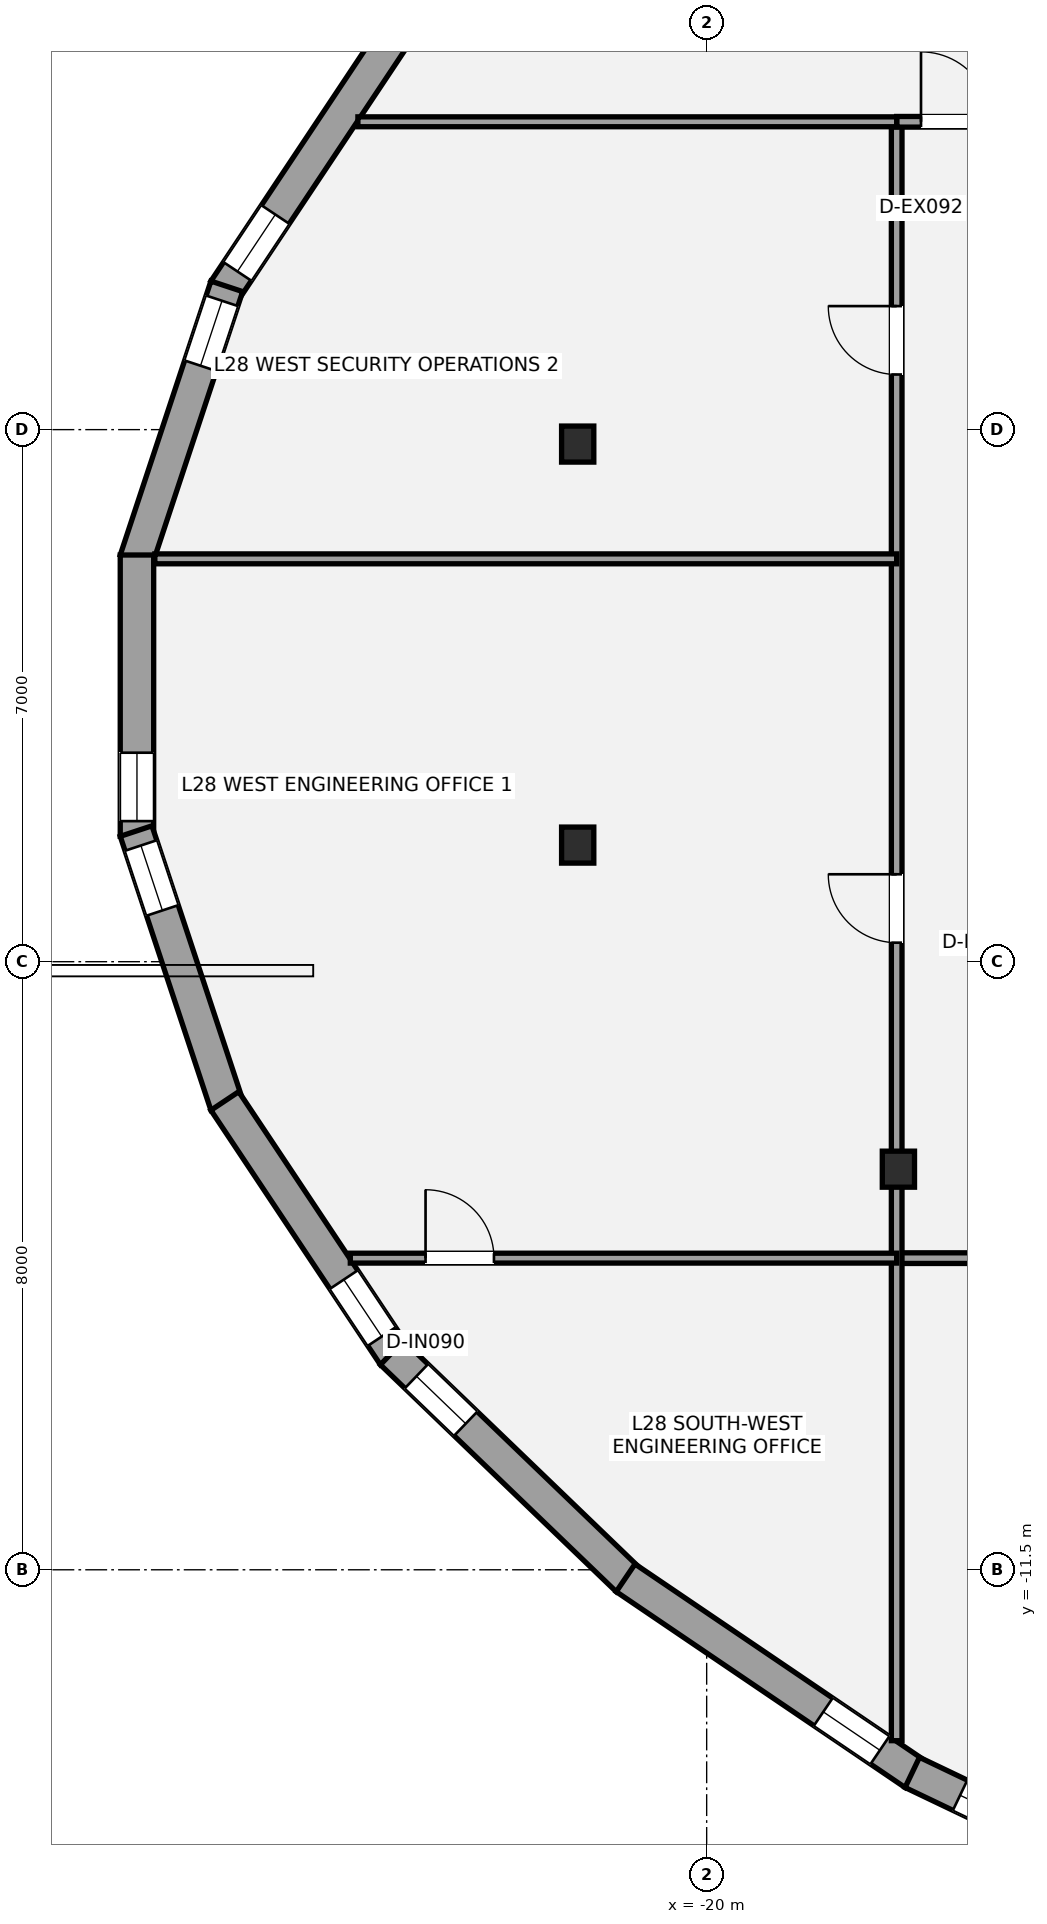
"""IFC4 building model, lengths in metres.
Left out: names, types, materials, properties, quantities, classifications, styles, units other than length and angle.
Written with IfcOpenShell. Run it as: python <this file> out.ifc"""

import sys

from ifc_helpers import new_model, si_unit, direction, frame, frame_2d, origin, origin_2d, place, context, subcontext, project, spatial, rectangle, i_section, extrude, element, fill, save


model = new_model("IFC4")
c1 = context("Model", 3, precision=1e-05, world=origin(), true_north=direction((0.0, 1.0)))
c2 = subcontext(c1, "Body", "Model", "MODEL_VIEW")
j1 = project(units=[si_unit("LENGTHUNIT", "METRE"), si_unit("PLANEANGLEUNIT", "RADIAN")], contexts=[c1])
p1 = place(None, origin())
s1 = spatial("IfcSite", under=j1, at=p1, CompositionType="ELEMENT")
p2 = place(p1, origin())
s2 = spatial("IfcBuilding", under=s1, at=p2, CompositionType="ELEMENT")
p3 = place(p2, frame((0.0, 0.0, 107.1)))
s3 = spatial("IfcBuildingStorey", under=s2, at=p3, CompositionType="ELEMENT", Elevation=107.1)
for number, where, z_axis, x_axis in (
    (1, (-21.697, 3.31, 0.0), (0.0, 0.0, 1.0), (1.0, 0.0, 0.0)),
    (2, (-21.697, -1.966, 0.0), (0.0, 0.0, 1.0), (1.0, 0.0, 0.0)),
    (3, (-17.477, -6.229, 0.0), (0.0, 0.0, 1.0), (1.0, 0.0, 0.0)),
):
    element("IfcColumn", number, at=place(p3, frame(where, z_axis=z_axis, x_axis=x_axis)), inside=s3, PredefinedType="COLUMN", context=c2, shape_type="SweptSolid", body=[
        extrude(i_section(OverallWidth=0.424, OverallDepth=0.474, WebThickness=0.048, FlangeThickness=0.077, at=origin_2d()), origin(), (0.0, 0.0, 1.0), 3.5),
    ])
p4 = place(p3, frame((-26.34, 5.332, 0.0), z_axis=(0.0, 0.0, 1.0), x_axis=(0.554293965046, 0.83232097193, 0.0)))
e4 = element("IfcWall", 4, at=p4, inside=s3, PredefinedType="STANDARD", context=c2, shape_type="SweptSolid", body=[
    extrude(rectangle(XDim=4.023, YDim=0.44, at=frame_2d((2.011, 0.0))), origin(), (0.0, 0.0, 1.0), 2.528),
])
p5 = place(p4, frame((0.299, 0.0, 0.58)))
e5 = element("IfcOpeningElement", 5, at=p5, cuts=e4, PredefinedType="OPENING", context=c2, shape_type="SweptSolid", body=[
    extrude(rectangle(XDim=0.9, YDim=1.35, at=frame_2d((0.45, 0.675))), frame((0.0, 0.23, 0.0), z_axis=(0.0, -1.0, 0.0), x_axis=(1.0, 0.0, 0.0)), (0.0, 0.0, 1.0), 0.46),
])
p6 = place(p3, frame((-27.507, 1.781, 0.0), z_axis=(0.0, 0.0, 1.0), x_axis=(0.314316911692, 0.94931811266, 0.0)))
e6 = element("IfcWall", 6, at=p6, inside=s3, PredefinedType="STANDARD", context=c2, shape_type="SweptSolid", body=[
    extrude(rectangle(XDim=3.796, YDim=0.44, at=frame_2d((1.898, 0.0))), origin(), (0.0, 0.0, 1.0), 2.528),
])
p7 = place(p6, frame((2.696, 0.0, 0.58)))
e7 = element("IfcOpeningElement", 7, at=p7, cuts=e6, PredefinedType="OPENING", context=c2, shape_type="SweptSolid", body=[
    extrude(rectangle(XDim=0.9, YDim=1.35, at=frame_2d((0.45, 0.675))), frame((0.0, 0.23, 0.0), z_axis=(0.0, -1.0, 0.0), x_axis=(1.0, 0.0, 0.0)), (0.0, 0.0, 1.0), 0.46),
])
p8 = place(p3, frame((-27.496, -1.851, 0.0), z_axis=(0.0, 0.0, 1.0), x_axis=(0.0, 1.0, 0.0)))
e8 = element("IfcWall", 8, at=p8, inside=s3, PredefinedType="STANDARD", context=c2, shape_type="SweptSolid", body=[
    extrude(rectangle(XDim=3.701, YDim=0.44, at=frame_2d((1.851, 0.0))), origin(), (0.0, 0.0, 1.0), 2.528),
])
p9 = place(p8, frame((0.2, 0.0, 0.42)))
e9 = element("IfcOpeningElement", 9, at=p9, cuts=e8, PredefinedType="OPENING", context=c2, shape_type="SweptSolid", body=[
    extrude(rectangle(XDim=0.9, YDim=1.35, at=frame_2d((0.45, 0.675))), frame((0.0, 0.23, 0.0), z_axis=(0.0, -1.0, 0.0), x_axis=(1.0, 0.0, 0.0)), (0.0, 0.0, 1.0), 0.46),
])
p10 = place(p3, frame((-26.314, -5.385, 0.0), z_axis=(0.0, 0.0, 1.0), x_axis=(-0.314316911692, 0.94931811266, 0.0)))
e10 = element("IfcWall", 10, at=p10, inside=s3, PredefinedType="STANDARD", context=c2, shape_type="SweptSolid", body=[
    extrude(rectangle(XDim=3.796, YDim=0.44, at=frame_2d((1.898, 0.0))), origin(), (0.0, 0.0, 1.0), 2.528),
])
p11 = place(p10, frame((2.696, 0.0, 0.58)))
e11 = element("IfcOpeningElement", 11, at=p11, cuts=e10, PredefinedType="OPENING", context=c2, shape_type="SweptSolid", body=[
    extrude(rectangle(XDim=0.9, YDim=1.35, at=frame_2d((0.45, 0.675))), frame((0.0, 0.23, 0.0), z_axis=(0.0, -1.0, 0.0), x_axis=(1.0, 0.0, 0.0)), (0.0, 0.0, 1.0), 0.46),
])
p12 = place(p3, frame((-24.11, -8.68, 0.0), z_axis=(0.0, 0.0, 1.0), x_axis=(-0.554293965046, 0.83232097193, 0.0)))
e12 = element("IfcWall", 12, at=p12, inside=s3, PredefinedType="STANDARD", context=c2, shape_type="SweptSolid", body=[
    extrude(rectangle(XDim=4.023, YDim=0.44, at=frame_2d((2.011, 0.0))), origin(), (0.0, 0.0, 1.0), 2.528),
])
p13 = place(p12, frame((0.299, 0.0, 0.58)))
e13 = element("IfcOpeningElement", 13, at=p13, cuts=e12, PredefinedType="OPENING", context=c2, shape_type="SweptSolid", body=[
    extrude(rectangle(XDim=0.9, YDim=1.35, at=frame_2d((0.45, 0.675))), frame((0.0, 0.23, 0.0), z_axis=(0.0, -1.0, 0.0), x_axis=(1.0, 0.0, 0.0)), (0.0, 0.0, 1.0), 0.46),
])
p14 = place(p3, frame((-21.037, -11.63, 0.0), z_axis=(0.0, 0.0, 1.0), x_axis=(-0.720581378362, 0.693370375166, 0.0)))
e14 = element("IfcWall", 14, at=p14, inside=s3, PredefinedType="STANDARD", context=c2, shape_type="SweptSolid", body=[
    extrude(rectangle(XDim=4.307, YDim=0.44, at=frame_2d((2.153, 0.0))), origin(), (0.0, 0.0, 1.0), 2.528),
])
p15 = place(p14, frame((2.96, 0.0, 0.58)))
e15 = element("IfcOpeningElement", 15, at=p15, cuts=e14, PredefinedType="OPENING", context=c2, shape_type="SweptSolid", body=[
    extrude(rectangle(XDim=0.9, YDim=1.35, at=frame_2d((0.45, 0.675))), frame((0.0, 0.23, 0.0), z_axis=(0.0, -1.0, 0.0), x_axis=(1.0, 0.0, 0.0)), (0.0, 0.0, 1.0), 0.46),
])
p16 = place(p3, frame((-17.266, -14.182, 0.0), z_axis=(0.0, 0.0, 1.0), x_axis=(-0.827754551165, 0.56109036975, 0.0)))
e16 = element("IfcWall", 16, at=p16, inside=s3, PredefinedType="STANDARD", context=c2, shape_type="SweptSolid", body=[
    extrude(rectangle(XDim=4.591, YDim=0.44, at=frame_2d((2.295, 0.0))), origin(), (0.0, 0.0, 1.0), 2.528),
])
p17 = place(p16, frame((0.549, 0.0, 0.58)))
e17 = element("IfcOpeningElement", 17, at=p17, cuts=e16, PredefinedType="OPENING", context=c2, shape_type="SweptSolid", body=[
    extrude(rectangle(XDim=0.9, YDim=1.35, at=frame_2d((0.45, 0.675))), frame((0.0, 0.23, 0.0), z_axis=(0.0, -1.0, 0.0), x_axis=(1.0, 0.0, 0.0)), (0.0, 0.0, 1.0), 0.46),
])
p18 = place(p3, frame((-12.89, -16.27, 0.0), z_axis=(0.0, 0.0, 1.0), x_axis=(-0.902372757907, 0.430956385018, 0.0)))
e18 = element("IfcWall", 18, at=p18, inside=s3, PredefinedType="STANDARD", context=c2, shape_type="SweptSolid", body=[
    extrude(rectangle(XDim=4.882, YDim=0.44, at=frame_2d((2.441, 0.0))), origin(), (0.0, 0.0, 1.0), 2.528),
])
p19 = place(p18, frame((3.284, 0.0, 0.58)))
e19 = element("IfcOpeningElement", 19, at=p19, cuts=e18, PredefinedType="OPENING", context=c2, shape_type="SweptSolid", body=[
    extrude(rectangle(XDim=0.9, YDim=1.35, at=frame_2d((0.45, 0.675))), frame((0.0, 0.23, 0.0), z_axis=(0.0, -1.0, 0.0), x_axis=(1.0, 0.0, 0.0)), (0.0, 0.0, 1.0), 0.46),
])
p20 = place(p3, frame((-17.5, -7.4, 0.0), z_axis=(0.0, 0.0, 1.0), x_axis=(1.0, 0.0, 0.0)))
e20 = element("IfcWall", 20, at=p20, inside=s3, PredefinedType="PARTITIONING", context=c2, shape_type="SweptSolid", body=[
    extrude(rectangle(XDim=33.2, YDim=0.14, at=frame_2d((16.6, 0.0))), origin(), (0.0, 0.0, 1.0), 2.688),
])
p21 = place(p20, frame((6.3, 0.0, 0.0)))
e21 = element("IfcOpeningElement", 21, at=p21, cuts=e20, PredefinedType="OPENING", context=c2, shape_type="SweptSolid", body=[
    extrude(rectangle(XDim=0.9, YDim=2.1, at=frame_2d((0.45, 1.05))), frame((0.0, 0.08, 0.0), z_axis=(0.0, -1.0, 0.0), x_axis=(1.0, 0.0, 0.0)), (0.0, 0.0, 1.0), 0.16),
])
p22 = place(p20, frame((18.05, 0.0, 0.0)))
e22 = element("IfcOpeningElement", 22, at=p22, cuts=e20, PredefinedType="OPENING", context=c2, shape_type="SweptSolid", body=[
    extrude(rectangle(XDim=0.9, YDim=2.1, at=frame_2d((0.45, 1.05))), frame((0.0, 0.08, 0.0), z_axis=(0.0, -1.0, 0.0), x_axis=(1.0, 0.0, 0.0)), (0.0, 0.0, 1.0), 0.16),
])
p23 = place(p20, frame((27.9, 0.0, 0.0)))
e23 = element("IfcOpeningElement", 23, at=p23, cuts=e20, PredefinedType="OPENING", context=c2, shape_type="SweptSolid", body=[
    extrude(rectangle(XDim=0.9, YDim=2.1, at=frame_2d((0.45, 1.05))), frame((0.0, 0.08, 0.0), z_axis=(0.0, -1.0, 0.0), x_axis=(1.0, 0.0, 0.0)), (0.0, 0.0, 1.0), 0.16),
])
p24 = place(p3, frame((-17.5, -13.748, 0.0), z_axis=(0.0, 0.0, 1.0), x_axis=(0.0, 1.0, 0.0)))
e24 = element("IfcWall", 24, at=p24, inside=s3, PredefinedType="PARTITIONING", context=c2, shape_type="SweptSolid", body=[
    extrude(rectangle(XDim=21.298, YDim=0.14, at=frame_2d((10.649, 0.0))), origin(), (0.0, 0.0, 1.0), 2.688),
])
p25 = place(p24, frame((10.499, 0.0, 0.0)))
e25 = element("IfcOpeningElement", 25, at=p25, cuts=e24, PredefinedType="OPENING", context=c2, shape_type="SweptSolid", body=[
    extrude(rectangle(XDim=0.9, YDim=2.1, at=frame_2d((0.45, 1.05))), frame((0.0, 0.08, 0.0), z_axis=(0.0, -1.0, 0.0), x_axis=(1.0, 0.0, 0.0)), (0.0, 0.0, 1.0), 0.16),
])
p26 = place(p24, frame((17.974, 0.0, 0.0)))
e26 = element("IfcOpeningElement", 26, at=p26, cuts=e24, PredefinedType="OPENING", context=c2, shape_type="SweptSolid", body=[
    extrude(rectangle(XDim=0.9, YDim=2.1, at=frame_2d((0.45, 1.05))), frame((0.0, 0.08, 0.0), z_axis=(0.0, -1.0, 0.0), x_axis=(1.0, 0.0, 0.0)), (0.0, 0.0, 1.0), 0.16),
])
p27 = place(p3, frame((-17.5, 7.55, 0.0), z_axis=(0.0, 0.0, 1.0), x_axis=(1.0, 0.0, 0.0)))
e27 = element("IfcWall", 27, at=p27, inside=s3, PredefinedType="PARTITIONING", context=c2, shape_type="SweptSolid", body=[
    extrude(rectangle(XDim=3.6, YDim=0.14, at=frame_2d((1.8, 0.0))), origin(), (0.0, 0.0, 1.0), 3.31),
])
p28 = place(p27, frame((0.32, 0.0, 0.0)))
e28 = element("IfcOpeningElement", 28, at=p28, cuts=e27, PredefinedType="OPENING", context=c2, shape_type="SweptSolid", body=[
    extrude(rectangle(XDim=0.92, YDim=2.15, at=frame_2d((0.46, 1.075))), frame((0.0, 0.08, 0.0), z_axis=(0.0, -1.0, 0.0), x_axis=(1.0, 0.0, 0.0)), (0.0, 0.0, 1.0), 0.16),
])
p29 = place(p3, frame((-24.589, 7.55, 0.0), z_axis=(0.0, 0.0, 1.0), x_axis=(1.0, 0.0, 0.0)))
e29 = element("IfcWall", 29, at=p29, inside=s3, PredefinedType="PARTITIONING", context=c2, shape_type="SweptSolid", body=[
    extrude(rectangle(XDim=7.089, YDim=0.13, at=frame_2d((3.544, 0.0))), origin(), (0.0, 0.0, 1.0), 2.763),
])
p30 = place(p3, frame((-24.689, -7.4, 0.0), z_axis=(0.0, 0.0, 1.0), x_axis=(1.0, 0.0, 0.0)))
e30 = element("IfcWall", 30, at=p30, inside=s3, PredefinedType="PARTITIONING", context=c2, shape_type="SweptSolid", body=[
    extrude(rectangle(XDim=7.189, YDim=0.13, at=frame_2d((3.594, 0.0))), origin(), (0.0, 0.0, 1.0), 2.763),
])
p31 = place(p30, frame((0.99, 0.0, 0.0)))
e31 = element("IfcOpeningElement", 31, at=p31, cuts=e30, PredefinedType="OPENING", context=c2, shape_type="SweptSolid", body=[
    extrude(rectangle(XDim=0.9, YDim=2.1, at=frame_2d((0.45, 1.05))), frame((0.0, 0.075, 0.0), z_axis=(0.0, -1.0, 0.0), x_axis=(1.0, 0.0, 0.0)), (0.0, 0.0, 1.0), 0.15),
])
p32 = place(p3, frame((-27.26, 1.8, 0.0), z_axis=(0.0, 0.0, 1.0), x_axis=(1.0, 0.0, 0.0)))
e32 = element("IfcWall", 32, at=p32, inside=s3, PredefinedType="PARTITIONING", context=c2, shape_type="SweptSolid", body=[
    extrude(rectangle(XDim=9.76, YDim=0.13, at=frame_2d((4.88, 0.0))), origin(), (0.0, 0.0, 1.0), 2.763),
])
p33 = place(p5, origin())
e33 = element("IfcWindow", 33, at=p33, inside=s3, PartitioningType="SINGLE_PANEL", PredefinedType="WINDOW", context=c2, shape_type="SweptSolid", body=[
    extrude(rectangle(XDim=0.9, YDim=1.35, at=frame_2d((0.45, 0.675))), frame((0.0, -0.01, 0.0), z_axis=(0.0, -1.0, 0.0), x_axis=(1.0, 0.0, 0.0)), (0.0, 0.0, 1.0), 0.06),
])
fill(e5, e33)
p34 = place(p7, origin())
e34 = element("IfcWindow", 34, at=p34, inside=s3, PartitioningType="SINGLE_PANEL", PredefinedType="WINDOW", context=c2, shape_type="SweptSolid", body=[
    extrude(rectangle(XDim=0.9, YDim=1.35, at=frame_2d((0.45, 0.675))), frame((0.0, -0.01, 0.0), z_axis=(0.0, -1.0, 0.0), x_axis=(1.0, 0.0, 0.0)), (0.0, 0.0, 1.0), 0.06),
])
fill(e7, e34)
p35 = place(p9, origin())
e35 = element("IfcWindow", 35, at=p35, inside=s3, PartitioningType="SINGLE_PANEL", PredefinedType="WINDOW", context=c2, shape_type="SweptSolid", body=[
    extrude(rectangle(XDim=0.9, YDim=1.35, at=frame_2d((0.45, 0.675))), frame((0.0, -0.01, 0.0), z_axis=(0.0, -1.0, 0.0), x_axis=(1.0, 0.0, 0.0)), (0.0, 0.0, 1.0), 0.06),
])
fill(e9, e35)
p36 = place(p11, origin())
e36 = element("IfcWindow", 36, at=p36, inside=s3, PartitioningType="SINGLE_PANEL", PredefinedType="WINDOW", context=c2, shape_type="SweptSolid", body=[
    extrude(rectangle(XDim=0.9, YDim=1.35, at=frame_2d((0.45, 0.675))), frame((0.0, -0.01, 0.0), z_axis=(0.0, -1.0, 0.0), x_axis=(1.0, 0.0, 0.0)), (0.0, 0.0, 1.0), 0.06),
])
fill(e11, e36)
p37 = place(p13, origin())
e37 = element("IfcWindow", 37, at=p37, inside=s3, PartitioningType="SINGLE_PANEL", PredefinedType="WINDOW", context=c2, shape_type="SweptSolid", body=[
    extrude(rectangle(XDim=0.9, YDim=1.35, at=frame_2d((0.45, 0.675))), frame((0.0, -0.01, 0.0), z_axis=(0.0, -1.0, 0.0), x_axis=(1.0, 0.0, 0.0)), (0.0, 0.0, 1.0), 0.06),
])
fill(e13, e37)
p38 = place(p15, origin())
e38 = element("IfcWindow", 38, at=p38, inside=s3, PartitioningType="SINGLE_PANEL", PredefinedType="WINDOW", context=c2, shape_type="SweptSolid", body=[
    extrude(rectangle(XDim=0.9, YDim=1.35, at=frame_2d((0.45, 0.675))), frame((0.0, -0.01, 0.0), z_axis=(0.0, -1.0, 0.0), x_axis=(1.0, 0.0, 0.0)), (0.0, 0.0, 1.0), 0.06),
])
fill(e15, e38)
p39 = place(p17, origin())
e39 = element("IfcWindow", 39, at=p39, inside=s3, PartitioningType="SINGLE_PANEL", PredefinedType="WINDOW", context=c2, shape_type="SweptSolid", body=[
    extrude(rectangle(XDim=0.9, YDim=1.35, at=frame_2d((0.45, 0.675))), frame((0.0, -0.01, 0.0), z_axis=(0.0, -1.0, 0.0), x_axis=(1.0, 0.0, 0.0)), (0.0, 0.0, 1.0), 0.06),
])
fill(e17, e39)
p40 = place(p19, origin())
e40 = element("IfcWindow", 40, at=p40, inside=s3, PartitioningType="SINGLE_PANEL", PredefinedType="WINDOW", context=c2, shape_type="SweptSolid", body=[
    extrude(rectangle(XDim=0.9, YDim=1.35, at=frame_2d((0.45, 0.675))), frame((0.0, -0.01, 0.0), z_axis=(0.0, -1.0, 0.0), x_axis=(1.0, 0.0, 0.0)), (0.0, 0.0, 1.0), 0.06),
])
fill(e19, e40)
p41 = place(p28, origin())
e41 = element("IfcDoor", 41, at=p41, inside=s3, OperationType="SINGLE_SWING_LEFT", PredefinedType="DOOR", context=c2, shape_type="SweptSolid", body=[
    extrude(rectangle(XDim=0.92, YDim=2.15, at=frame_2d((0.46, 1.075))), frame((0.0, 0.025, 0.0), z_axis=(0.0, -1.0, 0.0), x_axis=(1.0, 0.0, 0.0)), (0.0, 0.0, 1.0), 0.05),
])
fill(e28, e41)
p42 = place(p31, origin())
e42 = element("IfcDoor", 42, at=p42, inside=s3, OperationType="SINGLE_SWING_LEFT", PredefinedType="DOOR", context=c2, shape_type="SweptSolid", body=[
    extrude(rectangle(XDim=0.9, YDim=2.1, at=frame_2d((0.45, 1.05))), frame((0.0, 0.025, 0.0), z_axis=(0.0, -1.0, 0.0), x_axis=(1.0, 0.0, 0.0)), (0.0, 0.0, 1.0), 0.05),
])
fill(e31, e42)
p43 = place(p25, origin())
e43 = element("IfcDoor", 43, at=p43, inside=s3, OperationType="SINGLE_SWING_RIGHT", PredefinedType="DOOR", context=c2, shape_type="SweptSolid", body=[
    extrude(rectangle(XDim=0.9, YDim=2.1, at=frame_2d((0.45, 1.05))), frame((0.0, 0.025, 0.0), z_axis=(0.0, -1.0, 0.0), x_axis=(1.0, 0.0, 0.0)), (0.0, 0.0, 1.0), 0.05),
])
fill(e25, e43)
p44 = place(p26, origin())
e44 = element("IfcDoor", 44, at=p44, inside=s3, OperationType="SINGLE_SWING_RIGHT", PredefinedType="DOOR", context=c2, shape_type="SweptSolid", body=[
    extrude(rectangle(XDim=0.9, YDim=2.1, at=frame_2d((0.45, 1.05))), frame((0.0, 0.025, 0.0), z_axis=(0.0, -1.0, 0.0), x_axis=(1.0, 0.0, 0.0)), (0.0, 0.0, 1.0), 0.05),
])
fill(e26, e44)
save(model, sys.argv[1])
